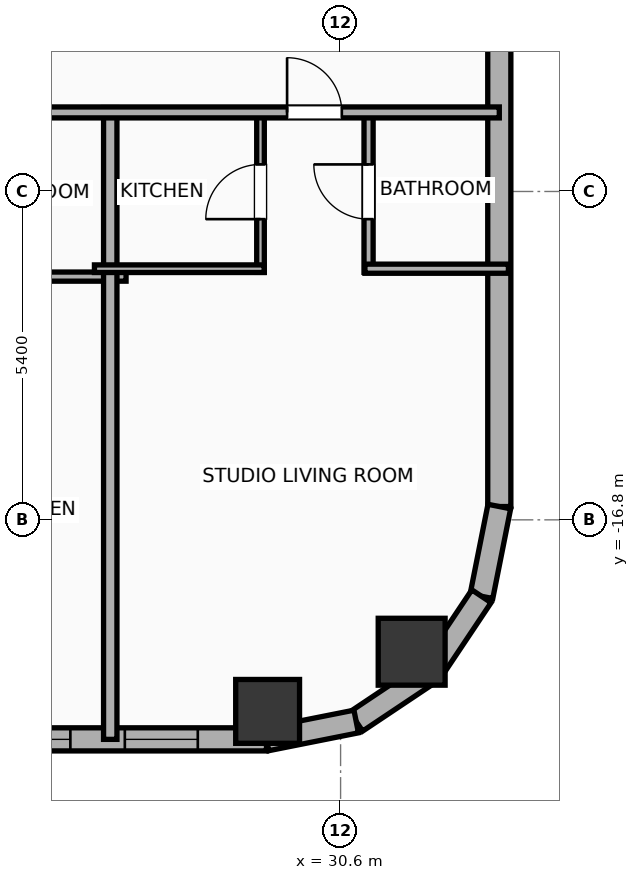
"""IFC4 building model, lengths in metres.
Left out: names, types, materials, properties, quantities, classifications, styles, units other than length and angle.
Written with IfcOpenShell. Run it as: python <this file> out.ifc"""

import sys

from ifc_helpers import new_model, si_unit, direction, frame, frame_2d, origin, origin_2d, place, context, subcontext, project, spatial, rectangle, hollow_rectangle, hollow_circle, extrude, element, fill, save


model = new_model("IFC4")
c1 = context("Model", 3, precision=1e-05, world=origin(), true_north=direction((0.0, 1.0)))
c2 = subcontext(c1, "Body", "Model", "MODEL_VIEW")
j1 = project(units=[si_unit("LENGTHUNIT", "METRE"), si_unit("PLANEANGLEUNIT", "RADIAN")], contexts=[c1])
p1 = place(None, origin())
s1 = spatial("IfcSite", under=j1, at=p1, CompositionType="ELEMENT")
p2 = place(p1, origin())
s2 = spatial("IfcBuilding", under=s1, at=p2, CompositionType="ELEMENT")
p3 = place(p2, frame((0.0, 0.0, 124.8)))
s3 = spatial("IfcBuildingStorey", under=s2, at=p3, CompositionType="ELEMENT", Elevation=124.8)
p4 = place(p3, frame((29.4, -19.95, 0.0), z_axis=(0.0, 0.0, 1.0), x_axis=(1.0, 0.0, 0.0)))
e1 = element("IfcColumn", 1, at=p4, inside=s3, PredefinedType="COLUMN", context=c2, shape_type="SweptSolid", body=[
    extrude(hollow_rectangle(XDim=1.05, YDim=1.05, WallThickness=0.036, at=origin_2d()), origin(), (0.0, 0.0, 1.0), 3.9),
])
p5 = place(p3, frame((31.769, -18.969, 0.0), z_axis=(0.0, 0.0, 1.0), x_axis=(1.0, 0.0, 0.0)))
e2 = element("IfcColumn", 2, at=p5, inside=s3, PredefinedType="COLUMN", context=c2, shape_type="SweptSolid", body=[
    extrude(hollow_circle(Radius=0.55, WallThickness=0.036, at=origin_2d()), origin(), (0.0, 0.0, 1.0), 3.9),
])
p6 = place(p3, frame((29.381, -20.41, 0.0), z_axis=(0.0, 0.0, 1.0), x_axis=(-1.0, 0.0, 0.0)))
e3 = element("IfcWall", 3, at=p6, inside=s3, PredefinedType="ELEMENTEDWALL", context=c2, shape_type="SweptSolid", body=[
    extrude(rectangle(XDim=54.763, YDim=0.38, at=frame_2d((27.381, 0.0))), origin(), (0.0, 0.0, 1.0), 3.65),
])
p7 = place(p6, frame((5.645, 0.0, 0.75)))
e4 = element("IfcOpeningElement", 4, at=p7, cuts=e3, PredefinedType="OPENING", context=c2, shape_type="SweptSolid", body=[
    extrude(rectangle(XDim=2.4, YDim=2.1, at=frame_2d((1.2, 1.05))), frame((0.0, 0.2, 0.0), z_axis=(0.0, -1.0, 0.0), x_axis=(1.0, 0.0, 0.0)), (0.0, 0.0, 1.0), 0.4),
])
p8 = place(p6, frame((18.486, 0.0, 0.75)))
e5 = element("IfcOpeningElement", 5, at=p8, cuts=e3, PredefinedType="OPENING", context=c2, shape_type="SweptSolid", body=[
    extrude(rectangle(XDim=2.4, YDim=2.1, at=frame_2d((1.2, 1.05))), frame((0.0, 0.2, 0.0), z_axis=(0.0, -1.0, 0.0), x_axis=(1.0, 0.0, 0.0)), (0.0, 0.0, 1.0), 0.4),
])
p9 = place(p6, frame((34.677, 0.0, 0.75)))
e6 = element("IfcOpeningElement", 6, at=p9, cuts=e3, PredefinedType="OPENING", context=c2, shape_type="SweptSolid", body=[
    extrude(rectangle(XDim=2.4, YDim=2.1, at=frame_2d((1.2, 1.05))), frame((0.0, 0.2, 0.0), z_axis=(0.0, -1.0, 0.0), x_axis=(1.0, 0.0, 0.0)), (0.0, 0.0, 1.0), 0.4),
])
p10 = place(p6, frame((46.717, 0.0, 0.75)))
e7 = element("IfcOpeningElement", 7, at=p10, cuts=e3, PredefinedType="OPENING", context=c2, shape_type="SweptSolid", body=[
    extrude(rectangle(XDim=2.4, YDim=2.1, at=frame_2d((1.2, 1.05))), frame((0.0, 0.2, 0.0), z_axis=(0.0, -1.0, 0.0), x_axis=(1.0, 0.0, 0.0)), (0.0, 0.0, 1.0), 0.4),
])
p11 = place(p6, frame((52.719, 0.0, 0.75)))
e8 = element("IfcOpeningElement", 8, at=p11, cuts=e3, PredefinedType="OPENING", context=c2, shape_type="SweptSolid", body=[
    extrude(rectangle(XDim=1.2, YDim=2.05, at=frame_2d((0.6, 1.025))), frame((0.0, 0.2, 0.0), z_axis=(0.0, -1.0, 0.0), x_axis=(1.0, 0.0, 0.0)), (0.0, 0.0, 1.0), 0.4),
])
p12 = place(p6, frame((50.786, 0.0, 0.75)))
e9 = element("IfcOpeningElement", 9, at=p12, cuts=e3, PredefinedType="OPENING", context=c2, shape_type="SweptSolid", body=[
    extrude(rectangle(XDim=1.2, YDim=2.05, at=frame_2d((0.6, 1.025))), frame((0.0, 0.2, 0.0), z_axis=(0.0, -1.0, 0.0), x_axis=(1.0, 0.0, 0.0)), (0.0, 0.0, 1.0), 0.4),
])
p13 = place(p6, frame((41.858, 0.0, 0.75)))
e10 = element("IfcOpeningElement", 10, at=p13, cuts=e3, PredefinedType="OPENING", context=c2, shape_type="SweptSolid", body=[
    extrude(rectangle(XDim=1.2, YDim=2.05, at=frame_2d((0.6, 1.025))), frame((0.0, 0.2, 0.0), z_axis=(0.0, -1.0, 0.0), x_axis=(1.0, 0.0, 0.0)), (0.0, 0.0, 1.0), 0.4),
])
p14 = place(p6, frame((38.556, 0.0, 0.75)))
e11 = element("IfcOpeningElement", 11, at=p14, cuts=e3, PredefinedType="OPENING", context=c2, shape_type="SweptSolid", body=[
    extrude(rectangle(XDim=1.2, YDim=2.05, at=frame_2d((0.6, 1.025))), frame((0.0, 0.2, 0.0), z_axis=(0.0, -1.0, 0.0), x_axis=(1.0, 0.0, 0.0)), (0.0, 0.0, 1.0), 0.4),
])
p15 = place(p6, frame((30.406, 0.0, 0.75)))
e12 = element("IfcOpeningElement", 12, at=p15, cuts=e3, PredefinedType="OPENING", context=c2, shape_type="SweptSolid", body=[
    extrude(rectangle(XDim=1.2, YDim=2.05, at=frame_2d((0.6, 1.025))), frame((0.0, 0.2, 0.0), z_axis=(0.0, -1.0, 0.0), x_axis=(1.0, 0.0, 0.0)), (0.0, 0.0, 1.0), 0.4),
])
p16 = place(p6, frame((25.434, 0.0, 0.75)))
e13 = element("IfcOpeningElement", 13, at=p16, cuts=e3, PredefinedType="OPENING", context=c2, shape_type="SweptSolid", body=[
    extrude(rectangle(XDim=1.2, YDim=2.05, at=frame_2d((0.6, 1.025))), frame((0.0, 0.2, 0.0), z_axis=(0.0, -1.0, 0.0), x_axis=(1.0, 0.0, 0.0)), (0.0, 0.0, 1.0), 0.4),
])
p17 = place(p6, frame((22.669, 0.0, 0.75)))
e14 = element("IfcOpeningElement", 14, at=p17, cuts=e3, PredefinedType="OPENING", context=c2, shape_type="SweptSolid", body=[
    extrude(rectangle(XDim=1.2, YDim=2.05, at=frame_2d((0.6, 1.025))), frame((0.0, 0.2, 0.0), z_axis=(0.0, -1.0, 0.0), x_axis=(1.0, 0.0, 0.0)), (0.0, 0.0, 1.0), 0.4),
])
p18 = place(p6, frame((15.954, 0.0, 0.75)))
e15 = element("IfcOpeningElement", 15, at=p18, cuts=e3, PredefinedType="OPENING", context=c2, shape_type="SweptSolid", body=[
    extrude(rectangle(XDim=1.2, YDim=2.05, at=frame_2d((0.6, 1.025))), frame((0.0, 0.2, 0.0), z_axis=(0.0, -1.0, 0.0), x_axis=(1.0, 0.0, 0.0)), (0.0, 0.0, 1.0), 0.4),
])
p19 = place(p6, frame((11.698, 0.0, 0.75)))
e16 = element("IfcOpeningElement", 16, at=p19, cuts=e3, PredefinedType="OPENING", context=c2, shape_type="SweptSolid", body=[
    extrude(rectangle(XDim=1.2, YDim=2.05, at=frame_2d((0.6, 1.025))), frame((0.0, 0.2, 0.0), z_axis=(0.0, -1.0, 0.0), x_axis=(1.0, 0.0, 0.0)), (0.0, 0.0, 1.0), 0.4),
])
p20 = place(p6, frame((3.225, 0.0, 0.75)))
e17 = element("IfcOpeningElement", 17, at=p20, cuts=e3, PredefinedType="OPENING", context=c2, shape_type="SweptSolid", body=[
    extrude(rectangle(XDim=1.2, YDim=2.05, at=frame_2d((0.6, 1.025))), frame((0.0, 0.2, 0.0), z_axis=(0.0, -1.0, 0.0), x_axis=(1.0, 0.0, 0.0)), (0.0, 0.0, 1.0), 0.4),
])
p21 = place(p6, frame((1.13, 0.0, 0.75)))
e18 = element("IfcOpeningElement", 18, at=p21, cuts=e3, PredefinedType="OPENING", context=c2, shape_type="SweptSolid", body=[
    extrude(rectangle(XDim=1.2, YDim=2.05, at=frame_2d((0.6, 1.025))), frame((0.0, 0.2, 0.0), z_axis=(0.0, -1.0, 0.0), x_axis=(1.0, 0.0, 0.0)), (0.0, 0.0, 1.0), 0.4),
])
p22 = place(p3, frame((33.21, 17.781, 0.0), z_axis=(0.0, 0.0, 1.0), x_axis=(0.0, -1.0, 0.0)))
e19 = element("IfcWall", 19, at=p22, inside=s3, PredefinedType="ELEMENTEDWALL", context=c2, shape_type="SweptSolid", body=[
    extrude(rectangle(XDim=34.363, YDim=0.38, at=frame_2d((17.181, 0.0))), origin(), (0.0, 0.0, 1.0), 3.65),
])
p23 = place(p22, frame((12.836, 0.0, 0.75)))
e20 = element("IfcOpeningElement", 20, at=p23, cuts=e19, PredefinedType="OPENING", context=c2, shape_type="SweptSolid", body=[
    extrude(rectangle(XDim=1.2, YDim=2.05, at=frame_2d((0.6, 1.025))), frame((0.0, 0.2, 0.0), z_axis=(0.0, -1.0, 0.0), x_axis=(1.0, 0.0, 0.0)), (0.0, 0.0, 1.0), 0.4),
])
p24 = place(p22, frame((21.386, 0.0, 0.75)))
e21 = element("IfcOpeningElement", 21, at=p24, cuts=e19, PredefinedType="OPENING", context=c2, shape_type="SweptSolid", body=[
    extrude(rectangle(XDim=1.2, YDim=2.05, at=frame_2d((0.6, 1.025))), frame((0.0, 0.2, 0.0), z_axis=(0.0, -1.0, 0.0), x_axis=(1.0, 0.0, 0.0)), (0.0, 0.0, 1.0), 0.4),
])
p25 = place(p3, frame((33.21, -16.581, 0.0), z_axis=(0.0, 0.0, 1.0), x_axis=(-0.195086038585, -0.980786132421, 0.0)))
e22 = element("IfcWall", 22, at=p25, inside=s3, PredefinedType="ELEMENTEDWALL", context=c2, shape_type="SweptSolid", body=[
    extrude(rectangle(XDim=1.504, YDim=0.38, at=frame_2d((0.752, 0.0))), origin(), (0.0, 0.0, 1.0), 3.65),
])
p26 = place(p3, frame((32.917, -18.057, 0.0), z_axis=(0.0, 0.0, 1.0), x_axis=(-0.555610286119, -0.831442848281, 0.0)))
e23 = element("IfcWall", 23, at=p26, inside=s3, PredefinedType="ELEMENTEDWALL", context=c2, shape_type="SweptSolid", body=[
    extrude(rectangle(XDim=1.485, YDim=0.38, at=frame_2d((0.743, 0.0))), origin(), (0.0, 0.0, 1.0), 3.65),
])
p27 = place(p3, frame((32.091, -19.292, 0.0), z_axis=(0.0, 0.0, 1.0), x_axis=(-0.831468045563, -0.555572577804, 0.0)))
e24 = element("IfcWall", 24, at=p27, inside=s3, PredefinedType="ELEMENTEDWALL", context=c2, shape_type="SweptSolid", body=[
    extrude(rectangle(XDim=1.485, YDim=0.38, at=frame_2d((0.742, 0.0))), origin(), (0.0, 0.0, 1.0), 3.65),
])
p28 = place(p3, frame((30.857, -20.116, 0.0), z_axis=(0.0, 0.0, 1.0), x_axis=(-0.980786132421, -0.195086038585, 0.0)))
e25 = element("IfcWall", 25, at=p28, inside=s3, PredefinedType="ELEMENTEDWALL", context=c2, shape_type="SweptSolid", body=[
    extrude(rectangle(XDim=1.504, YDim=0.38, at=frame_2d((0.752, 0.0))), origin(), (0.0, 0.0, 1.0), 3.65),
])
p29 = place(p3, frame((24.22, -12.8, 0.0), z_axis=(0.0, 0.0, 1.0), x_axis=(1.0, 0.0, 0.0)))
e26 = element("IfcWall", 26, at=p29, inside=s3, PredefinedType="PLUMBINGWALL", context=c2, shape_type="SweptSolid", body=[
    extrude(rectangle(XDim=2.852, YDim=0.15, at=frame_2d((1.426, 0.0))), origin(), (0.0, 0.0, 1.0), 3.65),
])
p30 = place(p3, frame((26.812, -20.41, 0.0), z_axis=(0.0, 0.0, 1.0), x_axis=(0.0, 1.0, 0.0)))
e27 = element("IfcWall", 27, at=p30, inside=s3, PredefinedType="PARTITIONING", context=c2, shape_type="SweptSolid", body=[
    extrude(rectangle(XDim=10.39, YDim=0.22, at=frame_2d((5.195, 0.0))), origin(), (0.0, 0.0, 1.0), 3.65),
])
p31 = place(p3, frame((29.283, -12.73, 0.0), z_axis=(0.0, 0.0, 1.0), x_axis=(0.0, 1.0, 0.0)))
e28 = element("IfcWall", 28, at=p31, inside=s3, PredefinedType="PARTITIONING", context=c2, shape_type="SweptSolid", body=[
    extrude(rectangle(XDim=2.65, YDim=0.125, at=frame_2d((1.325, 0.0))), origin(), (0.0, 0.0, 1.0), 3.65),
])
p32 = place(p31, frame((0.875, 0.0, 0.0)))
e29 = element("IfcOpeningElement", 29, at=p32, cuts=e28, PredefinedType="OPENING", context=c2, shape_type="SweptSolid", body=[
    extrude(rectangle(XDim=0.9, YDim=2.05, at=frame_2d((0.45, 1.025))), frame((0.0, 0.073, 0.0), z_axis=(0.0, -1.0, 0.0), x_axis=(1.0, 0.0, 0.0)), (0.0, 0.0, 1.0), 0.145),
])
p33 = place(p3, frame((31.06, -12.73, 0.0), z_axis=(0.0, 0.0, 1.0), x_axis=(0.0, 1.0, 0.0)))
e30 = element("IfcWall", 30, at=p33, inside=s3, PredefinedType="PLUMBINGWALL", context=c2, shape_type="SweptSolid", body=[
    extrude(rectangle(XDim=2.65, YDim=0.15, at=frame_2d((1.325, 0.0))), origin(), (0.0, 0.0, 1.0), 3.65),
])
p34 = place(p33, frame((0.875, 0.0, 0.0)))
e31 = element("IfcOpeningElement", 31, at=p34, cuts=e30, PredefinedType="OPENING", context=c2, shape_type="SweptSolid", body=[
    extrude(rectangle(XDim=0.9, YDim=2.05, at=frame_2d((0.45, 1.025))), frame((0.0, 0.085, 0.0), z_axis=(0.0, -1.0, 0.0), x_axis=(1.0, 0.0, 0.0)), (0.0, 0.0, 1.0), 0.17),
])
p35 = place(p3, frame((26.552, -12.67, 0.0), z_axis=(0.0, 0.0, 1.0), x_axis=(1.0, 0.0, 0.0)))
e32 = element("IfcWall", 32, at=p35, inside=s3, PredefinedType="PARTITIONING", context=c2, shape_type="SweptSolid", body=[
    extrude(rectangle(XDim=2.791, YDim=0.125, at=frame_2d((1.396, 0.0))), origin(), (0.0, 0.0, 1.0), 3.65),
])
p36 = place(p3, frame((31.0, -12.67, 0.0), z_axis=(0.0, 0.0, 1.0), x_axis=(1.0, 0.0, 0.0)))
e33 = element("IfcWall", 33, at=p36, inside=s3, PredefinedType="PLUMBINGWALL", context=c2, shape_type="SweptSolid", body=[
    extrude(rectangle(XDim=2.36, YDim=0.15, at=frame_2d((1.18, 0.0))), origin(), (0.0, 0.0, 1.0), 3.65),
])
p37 = place(p3, frame((-29.21, -10.1, 0.0), z_axis=(0.0, 0.0, 1.0), x_axis=(1.0, 0.0, 0.0)))
e34 = element("IfcWall", 34, at=p37, inside=s3, PredefinedType="PARTITIONING", context=c2, shape_type="SweptSolid", body=[
    extrude(rectangle(XDim=62.42, YDim=0.18, at=frame_2d((31.21, 0.0))), origin(), (0.0, 0.0, 1.0), 3.65),
])
p38 = place(p37, frame((2.671, 0.0, 0.0)))
e35 = element("IfcOpeningElement", 35, at=p38, cuts=e34, PredefinedType="OPENING", context=c2, shape_type="SweptSolid", body=[
    extrude(rectangle(XDim=0.9, YDim=2.05, at=frame_2d((0.45, 1.025))), frame((0.0, 0.1, 0.0), z_axis=(0.0, -1.0, 0.0), x_axis=(1.0, 0.0, 0.0)), (0.0, 0.0, 1.0), 0.2),
])
p39 = place(p37, frame((9.637, 0.0, 0.0)))
e36 = element("IfcOpeningElement", 36, at=p39, cuts=e34, PredefinedType="OPENING", context=c2, shape_type="SweptSolid", body=[
    extrude(rectangle(XDim=1.15, YDim=2.05, at=frame_2d((0.575, 1.025))), frame((0.0, 0.1, 0.0), z_axis=(0.0, -1.0, 0.0), x_axis=(1.0, 0.0, 0.0)), (0.0, 0.0, 1.0), 0.2),
])
p40 = place(p37, frame((14.843, 0.0, 0.0)))
e37 = element("IfcOpeningElement", 37, at=p40, cuts=e34, PredefinedType="OPENING", context=c2, shape_type="SweptSolid", body=[
    extrude(rectangle(XDim=0.9, YDim=2.05, at=frame_2d((0.45, 1.025))), frame((0.0, 0.1, 0.0), z_axis=(0.0, -1.0, 0.0), x_axis=(1.0, 0.0, 0.0)), (0.0, 0.0, 1.0), 0.2),
])
p41 = place(p37, frame((21.958, 0.0, 0.0)))
e38 = element("IfcOpeningElement", 38, at=p41, cuts=e34, PredefinedType="OPENING", context=c2, shape_type="SweptSolid", body=[
    extrude(rectangle(XDim=1.15, YDim=2.05, at=frame_2d((0.575, 1.025))), frame((0.0, 0.1, 0.0), z_axis=(0.0, -1.0, 0.0), x_axis=(1.0, 0.0, 0.0)), (0.0, 0.0, 1.0), 0.2),
])
p42 = place(p37, frame((27.258, 0.0, 0.0)))
e39 = element("IfcOpeningElement", 39, at=p42, cuts=e34, PredefinedType="OPENING", context=c2, shape_type="SweptSolid", body=[
    extrude(rectangle(XDim=0.9, YDim=2.05, at=frame_2d((0.45, 1.025))), frame((0.0, 0.1, 0.0), z_axis=(0.0, -1.0, 0.0), x_axis=(1.0, 0.0, 0.0)), (0.0, 0.0, 1.0), 0.2),
])
p43 = place(p37, frame((32.014, 0.0, 0.0)))
e40 = element("IfcOpeningElement", 40, at=p43, cuts=e34, PredefinedType="OPENING", context=c2, shape_type="SweptSolid", body=[
    extrude(rectangle(XDim=1.15, YDim=2.05, at=frame_2d((0.575, 1.025))), frame((0.0, 0.1, 0.0), z_axis=(0.0, -1.0, 0.0), x_axis=(1.0, 0.0, 0.0)), (0.0, 0.0, 1.0), 0.2),
])
p44 = place(p37, frame((38.369, 0.0, 0.0)))
e41 = element("IfcOpeningElement", 41, at=p44, cuts=e34, PredefinedType="OPENING", context=c2, shape_type="SweptSolid", body=[
    extrude(rectangle(XDim=1.15, YDim=2.05, at=frame_2d((0.575, 1.025))), frame((0.0, 0.1, 0.0), z_axis=(0.0, -1.0, 0.0), x_axis=(1.0, 0.0, 0.0)), (0.0, 0.0, 1.0), 0.2),
])
p45 = place(p37, frame((46.09, 0.0, 0.0)))
e42 = element("IfcOpeningElement", 42, at=p45, cuts=e34, PredefinedType="OPENING", context=c2, shape_type="SweptSolid", body=[
    extrude(rectangle(XDim=0.9, YDim=2.05, at=frame_2d((0.45, 1.025))), frame((0.0, 0.1, 0.0), z_axis=(0.0, -1.0, 0.0), x_axis=(1.0, 0.0, 0.0)), (0.0, 0.0, 1.0), 0.2),
])
p46 = place(p37, frame((51.015, 0.0, 0.0)))
e43 = element("IfcOpeningElement", 43, at=p46, cuts=e34, PredefinedType="OPENING", context=c2, shape_type="SweptSolid", body=[
    extrude(rectangle(XDim=1.15, YDim=2.05, at=frame_2d((0.575, 1.025))), frame((0.0, 0.1, 0.0), z_axis=(0.0, -1.0, 0.0), x_axis=(1.0, 0.0, 0.0)), (0.0, 0.0, 1.0), 0.2),
])
p47 = place(p37, frame((58.93, 0.0, 0.0)))
e44 = element("IfcOpeningElement", 44, at=p47, cuts=e34, PredefinedType="OPENING", context=c2, shape_type="SweptSolid", body=[
    extrude(rectangle(XDim=0.9, YDim=2.05, at=frame_2d((0.45, 1.025))), frame((0.0, 0.1, 0.0), z_axis=(0.0, -1.0, 0.0), x_axis=(1.0, 0.0, 0.0)), (0.0, 0.0, 1.0), 0.2),
])
p48 = place(p20, origin())
e45 = element("IfcWindow", 45, at=p48, inside=s3, PartitioningType="SINGLE_PANEL", PredefinedType="WINDOW", context=c2, shape_type="SweptSolid", body=[
    extrude(rectangle(XDim=1.2, YDim=2.05, at=frame_2d((0.6, 1.025))), frame((0.0, 0.03, 0.0), z_axis=(0.0, -1.0, 0.0), x_axis=(1.0, 0.0, 0.0)), (0.0, 0.0, 1.0), 0.06),
])
fill(e17, e45)
p49 = place(p21, origin())
e46 = element("IfcWindow", 46, at=p49, inside=s3, PartitioningType="SINGLE_PANEL", PredefinedType="WINDOW", context=c2, shape_type="SweptSolid", body=[
    extrude(rectangle(XDim=1.2, YDim=2.05, at=frame_2d((0.6, 1.025))), frame((0.0, 0.03, 0.0), z_axis=(0.0, -1.0, 0.0), x_axis=(1.0, 0.0, 0.0)), (0.0, 0.0, 1.0), 0.06),
])
fill(e18, e46)
p50 = place(p32, origin())
e47 = element("IfcDoor", 47, at=p50, inside=s3, OperationType="SINGLE_SWING_LEFT", PredefinedType="DOOR", context=c2, shape_type="SweptSolid", body=[
    extrude(rectangle(XDim=0.9, YDim=2.05, at=frame_2d((0.45, 1.025))), frame((0.0, 0.025, 0.0), z_axis=(0.0, -1.0, 0.0), x_axis=(1.0, 0.0, 0.0)), (0.0, 0.0, 1.0), 0.05),
])
fill(e29, e47)
p51 = place(p34, origin())
e48 = element("IfcDoor", 48, at=p51, inside=s3, OperationType="SINGLE_SWING_RIGHT", PredefinedType="DOOR", context=c2, shape_type="SweptSolid", body=[
    extrude(rectangle(XDim=0.9, YDim=2.05, at=frame_2d((0.45, 1.025))), frame((0.0, 0.025, 0.0), z_axis=(0.0, -1.0, 0.0), x_axis=(1.0, 0.0, 0.0)), (0.0, 0.0, 1.0), 0.05),
])
fill(e31, e48)
p52 = place(p47, origin())
e49 = element("IfcDoor", 49, at=p52, inside=s3, OperationType="SINGLE_SWING_LEFT", PredefinedType="DOOR", context=c2, shape_type="SweptSolid", body=[
    extrude(rectangle(XDim=0.9, YDim=2.05, at=frame_2d((0.45, 1.025))), frame((0.0, 0.025, 0.0), z_axis=(0.0, -1.0, 0.0), x_axis=(1.0, 0.0, 0.0)), (0.0, 0.0, 1.0), 0.05),
])
fill(e44, e49)
save(model, sys.argv[1])
